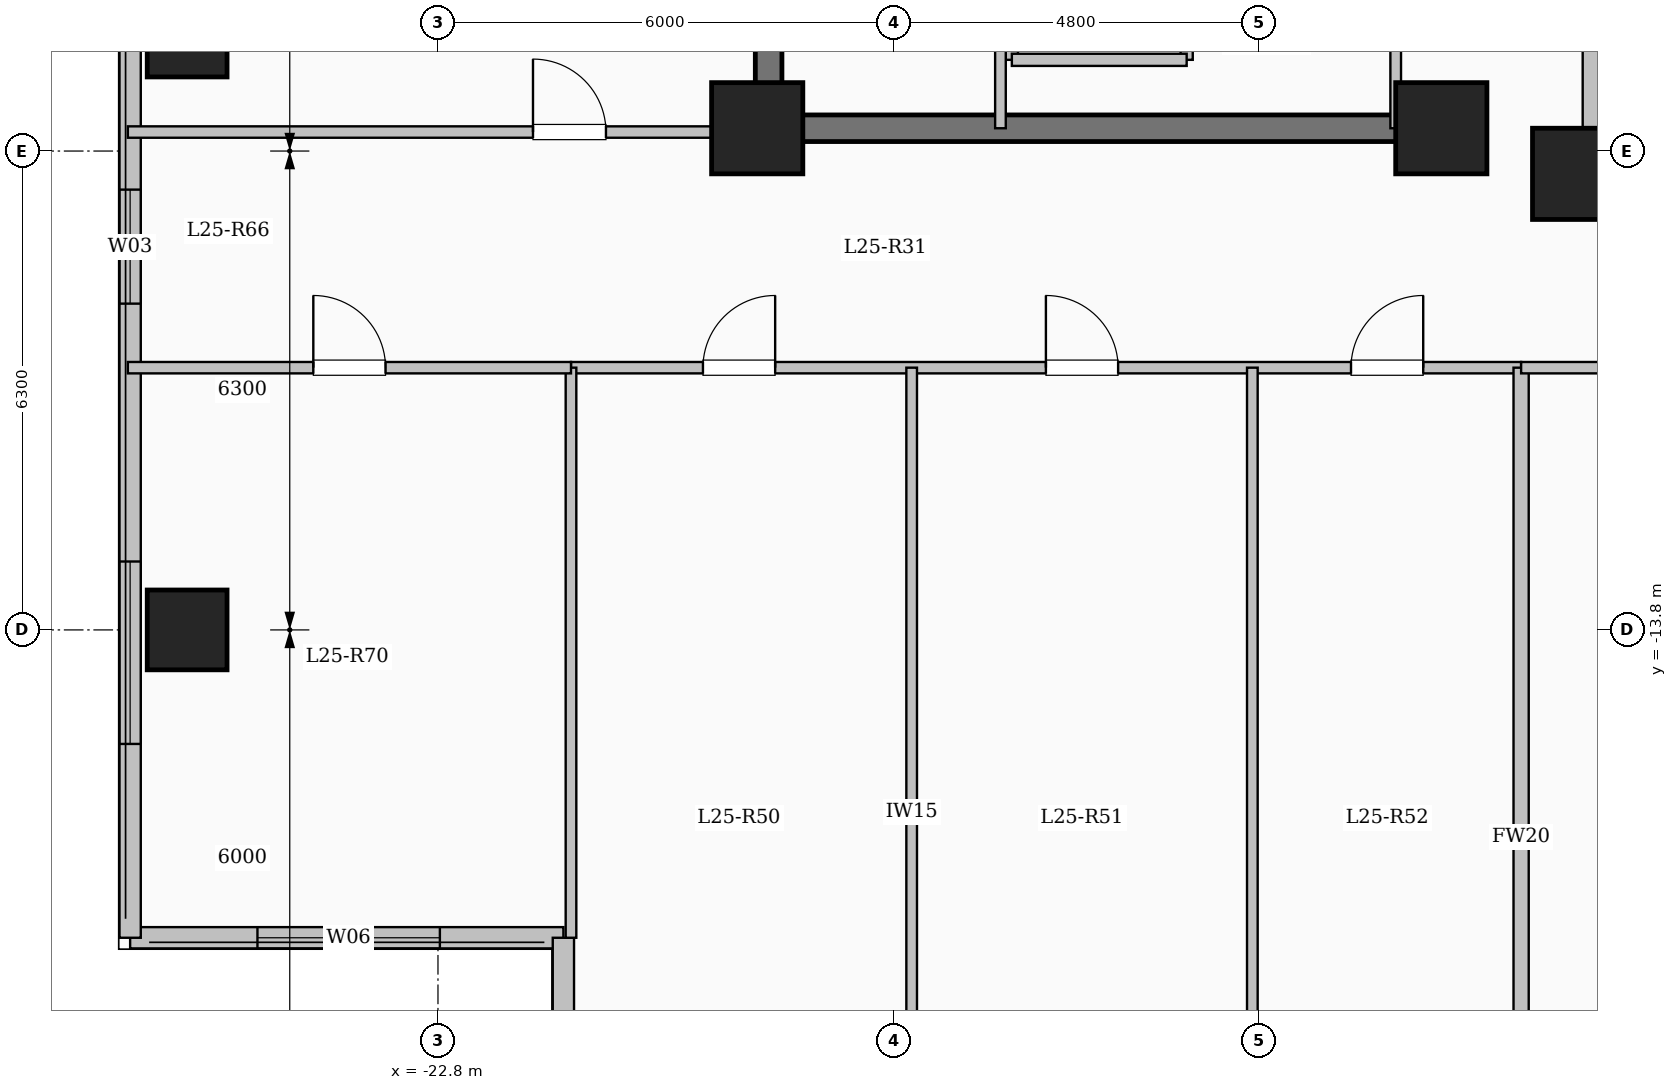
"""IFC4 building model, lengths in metres.
Left out: names, types, materials, properties, quantities, classifications, styles, units other than length and angle.
Written with IfcOpenShell. Run it as: python <this file> out.ifc"""

import sys

from ifc_helpers import new_model, si_unit, direction, frame, frame_2d, origin, origin_2d, place, context, subcontext, project, spatial, rectangle, extrude, element, fill, save


model = new_model("IFC4")
c1 = context("Model", 3, precision=1e-05, world=origin(), true_north=direction((0.0, 1.0)))
c2 = subcontext(c1, "Body", "Model", "MODEL_VIEW")
j1 = project(units=[si_unit("LENGTHUNIT", "METRE"), si_unit("PLANEANGLEUNIT", "RADIAN")], contexts=[c1])
p1 = place(None, origin())
s1 = spatial("IfcSite", under=j1, at=p1, CompositionType="ELEMENT")
p2 = place(p1, origin())
s2 = spatial("IfcBuilding", under=s1, at=p2, CompositionType="ELEMENT")
p3 = place(p2, frame((0.0, 0.0, 95.05)))
s3 = spatial("IfcBuildingStorey", under=s2, at=p3, CompositionType="ELEMENT", Elevation=95.05)
for number, where, z_axis, x_axis in (
    (1, (-7.8, -7.8, 0.0), (0.0, 0.0, 1.0), (1.0, 0.0, 0.0)),
    (2, (-9.6, -7.2, 0.0), (0.0, 0.0, 1.0), (1.0, 0.0, 0.0)),
    (3, (-18.6, -7.2, 0.0), (0.0, 0.0, 1.0), (1.0, 0.0, 0.0)),
):
    element("IfcColumn", number, at=place(p3, frame(where, z_axis=z_axis, x_axis=x_axis)), inside=s3, PredefinedType="COLUMN", context=c2, shape_type="SweptSolid", body=[
        extrude(rectangle(XDim=1.2, YDim=1.2, at=origin_2d()), origin(), (0.0, 0.0, 1.0), 3.35),
    ])
for number, where, z_axis, x_axis in (
    (4, (-26.1, -13.8, 0.0), (0.0, 0.0, 1.0), (1.0, 0.0, 0.0)),
    (5, (-26.1, -6.0, 0.0), (0.0, 0.0, 1.0), (1.0, 0.0, 0.0)),
):
    element("IfcColumn", number, at=place(p3, frame(where, z_axis=z_axis, x_axis=x_axis)), inside=s3, PredefinedType="COLUMN", context=c2, shape_type="SweptSolid", body=[
        extrude(rectangle(XDim=1.05, YDim=1.05, at=origin_2d()), origin(), (0.0, 0.0, 1.0), 3.35),
    ])
p4 = place(p3, frame((-7.62, -7.62, 0.0), z_axis=(0.0, 0.0, 1.0), x_axis=(1.0, 0.0, 0.0)))
e6 = element("IfcWall", 6, at=p4, inside=s3, PredefinedType="SOLIDWALL", context=c2, shape_type="SweptSolid", body=[
    extrude(rectangle(XDim=15.24, YDim=0.24, at=frame_2d((7.62, 0.0))), origin(), (0.0, 0.0, 1.0), 3.1),
])
p5 = place(p4, frame((6.92, 0.0, 0.95)))
e7 = element("IfcOpeningElement", 7, at=p5, cuts=e6, PredefinedType="OPENING", context=c2, shape_type="SweptSolid", body=[
    extrude(rectangle(XDim=1.4, YDim=1.5, at=frame_2d((0.7, 0.75))), frame((0.0, 0.13, 0.0), z_axis=(0.0, -1.0, 0.0), x_axis=(1.0, 0.0, 0.0)), (0.0, 0.0, 1.0), 0.26),
])
p6 = place(p3, frame((-7.62, 7.62, 0.0), z_axis=(0.0, 0.0, 1.0), x_axis=(0.0, -1.0, 0.0)))
e8 = element("IfcWall", 8, at=p6, inside=s3, PredefinedType="SOLIDWALL", context=c2, shape_type="SweptSolid", body=[
    extrude(rectangle(XDim=15.24, YDim=0.24, at=frame_2d((7.62, 0.0))), origin(), (0.0, 0.0, 1.0), 3.1),
])
p7 = place(p6, frame((6.92, 0.0, 0.95)))
e9 = element("IfcOpeningElement", 9, at=p7, cuts=e8, PredefinedType="OPENING", context=c2, shape_type="SweptSolid", body=[
    extrude(rectangle(XDim=1.4, YDim=1.5, at=frame_2d((0.7, 0.75))), frame((0.0, 0.13, 0.0), z_axis=(0.0, -1.0, 0.0), x_axis=(1.0, 0.0, 0.0)), (0.0, 0.0, 1.0), 0.26),
])
p8 = place(p3, frame((-21.15, -17.85, 0.0), z_axis=(0.0, 0.0, 1.0), x_axis=(-1.0, 0.0, 0.0)))
e10 = element("IfcWall", 10, at=p8, inside=s3, PredefinedType="SOLIDWALL", context=c2, shape_type="SweptSolid", body=[
    extrude(rectangle(XDim=5.7, YDim=0.28, at=frame_2d((2.85, 0.0))), origin(), (0.0, 0.0, 1.0), 3.1),
])
p9 = place(p8, frame((1.625, 0.0, 0.9)))
e11 = element("IfcOpeningElement", 11, at=p9, cuts=e10, PredefinedType="OPENING", context=c2, shape_type="SweptSolid", body=[
    extrude(rectangle(XDim=2.4, YDim=1.8, at=frame_2d((1.2, 0.9))), frame((0.0, 0.15, 0.0), z_axis=(0.0, -1.0, 0.0), x_axis=(1.0, 0.0, 0.0)), (0.0, 0.0, 1.0), 0.3),
])
p10 = place(p3, frame((-26.85, -17.85, 0.0), z_axis=(0.0, 0.0, 1.0), x_axis=(0.0, 1.0, 0.0)))
e12 = element("IfcWall", 12, at=p10, inside=s3, PredefinedType="SOLIDWALL", context=c2, shape_type="SweptSolid", body=[
    extrude(rectangle(XDim=35.7, YDim=0.28, at=frame_2d((17.85, 0.0))), origin(), (0.0, 0.0, 1.0), 3.1),
])
p11 = place(p10, frame((2.55, 0.0, 0.9)))
e13 = element("IfcOpeningElement", 13, at=p11, cuts=e12, PredefinedType="OPENING", context=c2, shape_type="SweptSolid", body=[
    extrude(rectangle(XDim=2.4, YDim=1.8, at=frame_2d((1.2, 0.9))), frame((0.0, 0.15, 0.0), z_axis=(0.0, -1.0, 0.0), x_axis=(1.0, 0.0, 0.0)), (0.0, 0.0, 1.0), 0.3),
])
p12 = place(p10, frame((8.343, 0.0, 0.9)))
e14 = element("IfcOpeningElement", 14, at=p12, cuts=e12, PredefinedType="OPENING", context=c2, shape_type="SweptSolid", body=[
    extrude(rectangle(XDim=1.5, YDim=1.65, at=frame_2d((0.75, 0.825))), frame((0.0, 0.15, 0.0), z_axis=(0.0, -1.0, 0.0), x_axis=(1.0, 0.0, 0.0)), (0.0, 0.0, 1.0), 0.3),
])
p13 = place(p10, frame((13.75, 0.0, 0.9)))
e15 = element("IfcOpeningElement", 15, at=p13, cuts=e12, PredefinedType="OPENING", context=c2, shape_type="SweptSolid", body=[
    extrude(rectangle(XDim=2.4, YDim=1.8, at=frame_2d((1.2, 0.9))), frame((0.0, 0.15, 0.0), z_axis=(0.0, -1.0, 0.0), x_axis=(1.0, 0.0, 0.0)), (0.0, 0.0, 1.0), 0.3),
])
p14 = place(p10, frame((20.175, 0.0, 0.9)))
e16 = element("IfcOpeningElement", 16, at=p14, cuts=e12, PredefinedType="OPENING", context=c2, shape_type="SweptSolid", body=[
    extrude(rectangle(XDim=1.8, YDim=1.65, at=frame_2d((0.9, 0.825))), frame((0.0, 0.15, 0.0), z_axis=(0.0, -1.0, 0.0), x_axis=(1.0, 0.0, 0.0)), (0.0, 0.0, 1.0), 0.3),
])
p15 = place(p10, frame((24.725, 0.0, 0.9)))
e17 = element("IfcOpeningElement", 17, at=p15, cuts=e12, PredefinedType="OPENING", context=c2, shape_type="SweptSolid", body=[
    extrude(rectangle(XDim=2.0, YDim=1.7, at=frame_2d((1.0, 0.85))), frame((0.0, 0.15, 0.0), z_axis=(0.0, -1.0, 0.0), x_axis=(1.0, 0.0, 0.0)), (0.0, 0.0, 1.0), 0.3),
])
p16 = place(p10, frame((28.975, 0.0, 0.95)))
e18 = element("IfcOpeningElement", 18, at=p16, cuts=e12, PredefinedType="OPENING", context=c2, shape_type="SweptSolid", body=[
    extrude(rectangle(XDim=1.0, YDim=1.5, at=frame_2d((0.5, 0.75))), frame((0.0, 0.15, 0.0), z_axis=(0.0, -1.0, 0.0), x_axis=(1.0, 0.0, 0.0)), (0.0, 0.0, 1.0), 0.3),
])
p17 = place(p10, frame((32.025, 0.0, 0.9)))
e19 = element("IfcOpeningElement", 19, at=p17, cuts=e12, PredefinedType="OPENING", context=c2, shape_type="SweptSolid", body=[
    extrude(rectangle(XDim=2.0, YDim=1.7, at=frame_2d((1.0, 0.85))), frame((0.0, 0.15, 0.0), z_axis=(0.0, -1.0, 0.0), x_axis=(1.0, 0.0, 0.0)), (0.0, 0.0, 1.0), 0.3),
])
p18 = place(p3, frame((-21.15, -22.05, 0.0), z_axis=(0.0, 0.0, 1.0), x_axis=(0.0, 1.0, 0.0)))
e20 = element("IfcWall", 20, at=p18, inside=s3, PredefinedType="SOLIDWALL", context=c2, shape_type="SweptSolid", body=[
    extrude(rectangle(XDim=4.2, YDim=0.28, at=frame_2d((2.1, 0.0))), origin(), (0.0, 0.0, 1.0), 3.1),
])
p19 = place(p18, frame((1.118, 0.0, 0.9)))
e21 = element("IfcOpeningElement", 21, at=p19, cuts=e20, PredefinedType="OPENING", context=c2, shape_type="SweptSolid", body=[
    extrude(rectangle(XDim=2.0, YDim=1.7, at=frame_2d((1.0, 0.85))), frame((0.0, 0.15, 0.0), z_axis=(0.0, -1.0, 0.0), x_axis=(1.0, 0.0, 0.0)), (0.0, 0.0, 1.0), 0.3),
])
for number, where, z_axis, x_axis in (
    (22, (-15.25, -6.3, 0.0), (0.0, 0.0, 1.0), (0.0, 1.0, 0.0)),
    (23, (-12.95, -6.3, 0.0), (0.0, 0.0, 1.0), (0.0, 1.0, 0.0)),
):
    element("IfcWall", number, at=place(p3, frame(where, z_axis=z_axis, x_axis=x_axis)), inside=s3, PredefinedType="SOLIDWALL", context=c2, shape_type="SweptSolid", body=[
        extrude(rectangle(XDim=2.6, YDim=0.16, at=frame_2d((1.3, 0.0))), origin(), (0.0, 0.0, 1.0), 3.1),
    ])
p20 = place(p3, frame((-15.25, -6.3, 0.0), z_axis=(0.0, 0.0, 1.0), x_axis=(1.0, 0.0, 0.0)))
e24 = element("IfcWall", 24, at=p20, inside=s3, PredefinedType="SOLIDWALL", context=c2, shape_type="SweptSolid", body=[
    extrude(rectangle(XDim=2.3, YDim=0.16, at=frame_2d((1.15, 0.0))), origin(), (0.0, 0.0, 1.0), 3.1),
])
p21 = place(p3, frame((-18.45, -7.375, 0.0), z_axis=(0.0, 0.0, 1.0), x_axis=(0.0, 1.0, 0.0)))
e25 = element("IfcWall", 25, at=p21, inside=s3, PredefinedType="SHEAR", context=c2, shape_type="SweptSolid", body=[
    extrude(rectangle(XDim=14.05, YDim=0.35, at=frame_2d((7.025, 0.0))), origin(), (0.0, 0.0, 1.0), 3.35),
])
p22 = place(p3, frame((-18.625, -7.2, 0.0), z_axis=(0.0, 0.0, 1.0), x_axis=(1.0, 0.0, 0.0)))
e26 = element("IfcWall", 26, at=p22, inside=s3, PredefinedType="SHEAR", context=c2, shape_type="SweptSolid", body=[
    extrude(rectangle(XDim=8.55, YDim=0.35, at=frame_2d((4.275, 0.0))), origin(), (0.0, 0.0, 1.0), 3.35),
])
p23 = place(p3, frame((-15.4, -7.2, 0.0), z_axis=(0.0, 0.0, 1.0), x_axis=(0.0, 1.0, 0.0)))
e27 = element("IfcWall", 27, at=p23, inside=s3, PredefinedType="PARTITIONING", context=c2, shape_type="SweptSolid", body=[
    extrude(rectangle(XDim=10.45, YDim=0.14, at=frame_2d((5.225, 0.0))), origin(), (0.0, 0.0, 1.0), 3.1),
])
p24 = place(p23, frame((9.25, 0.0, 0.0)))
e28 = element("IfcOpeningElement", 28, at=p24, cuts=e27, PredefinedType="OPENING", context=c2, shape_type="SweptSolid", body=[
    extrude(rectangle(XDim=0.9, YDim=2.08, at=frame_2d((0.45, 1.04))), frame((0.0, 0.08, 0.0), z_axis=(0.0, -1.0, 0.0), x_axis=(1.0, 0.0, 0.0)), (0.0, 0.0, 1.0), 0.16),
])
p25 = place(p3, frame((-10.2, -7.2, 0.0), z_axis=(0.0, 0.0, 1.0), x_axis=(0.0, 1.0, 0.0)))
e29 = element("IfcWall", 29, at=p25, inside=s3, PredefinedType="PARTITIONING", context=c2, shape_type="SweptSolid", body=[
    extrude(rectangle(XDim=9.12, YDim=0.14, at=frame_2d((4.56, 0.0))), origin(), (0.0, 0.0, 1.0), 3.1),
])
p26 = place(p25, frame((1.9, 0.0, 0.0)))
e30 = element("IfcOpeningElement", 30, at=p26, cuts=e29, PredefinedType="OPENING", context=c2, shape_type="SweptSolid", body=[
    extrude(rectangle(XDim=0.95, YDim=2.12, at=frame_2d((0.475, 1.06))), frame((0.0, 0.08, 0.0), z_axis=(0.0, -1.0, 0.0), x_axis=(1.0, 0.0, 0.0)), (0.0, 0.0, 1.0), 0.16),
])
p27 = place(p25, frame((5.0, 0.0, 0.0)))
e31 = element("IfcOpeningElement", 31, at=p27, cuts=e29, PredefinedType="OPENING", context=c2, shape_type="SweptSolid", body=[
    extrude(rectangle(XDim=0.95, YDim=2.12, at=frame_2d((0.475, 1.06))), frame((0.0, 0.08, 0.0), z_axis=(0.0, -1.0, 0.0), x_axis=(1.0, 0.0, 0.0)), (0.0, 0.0, 1.0), 0.16),
])
p28 = place(p3, frame((-21.05, -10.35, 0.0), z_axis=(0.0, 0.0, 1.0), x_axis=(1.0, 0.0, 0.0)))
e32 = element("IfcWall", 32, at=p28, inside=s3, PredefinedType="PARTITIONING", context=c2, shape_type="SweptSolid", body=[
    extrude(rectangle(XDim=12.5, YDim=0.15, at=frame_2d((6.25, 0.0))), origin(), (0.0, 0.0, 1.0), 3.1),
])
p29 = place(p28, frame((1.736, 0.0, 0.0)))
e33 = element("IfcOpeningElement", 33, at=p29, cuts=e32, PredefinedType="OPENING", context=c2, shape_type="SweptSolid", body=[
    extrude(rectangle(XDim=0.95, YDim=2.15, at=frame_2d((0.475, 1.075))), frame((0.0, 0.085, 0.0), z_axis=(0.0, -1.0, 0.0), x_axis=(1.0, 0.0, 0.0)), (0.0, 0.0, 1.0), 0.17),
])
p30 = place(p28, frame((6.248, 0.0, 0.0)))
e34 = element("IfcOpeningElement", 34, at=p30, cuts=e32, PredefinedType="OPENING", context=c2, shape_type="SweptSolid", body=[
    extrude(rectangle(XDim=0.95, YDim=2.15, at=frame_2d((0.475, 1.075))), frame((0.0, 0.085, 0.0), z_axis=(0.0, -1.0, 0.0), x_axis=(1.0, 0.0, 0.0)), (0.0, 0.0, 1.0), 0.17),
])
p31 = place(p28, frame((10.262, 0.0, 0.0)))
e35 = element("IfcOpeningElement", 35, at=p31, cuts=e32, PredefinedType="OPENING", context=c2, shape_type="SweptSolid", body=[
    extrude(rectangle(XDim=0.95, YDim=2.15, at=frame_2d((0.475, 1.075))), frame((0.0, 0.085, 0.0), z_axis=(0.0, -1.0, 0.0), x_axis=(1.0, 0.0, 0.0)), (0.0, 0.0, 1.0), 0.17),
])
for number, where, z_axis, x_axis in (
    (36, (-16.568, -22.05, 0.0), (0.0, 0.0, 1.0), (0.0, 1.0, 0.0)),
    (37, (-12.086, -22.05, 0.0), (0.0, 0.0, 1.0), (0.0, 1.0, 0.0)),
):
    element("IfcWall", number, at=place(p3, frame(where, z_axis=z_axis, x_axis=x_axis)), inside=s3, PredefinedType="PARTITIONING", context=c2, shape_type="SweptSolid", body=[
        extrude(rectangle(XDim=11.7, YDim=0.14, at=frame_2d((5.85, 0.0))), origin(), (0.0, 0.0, 1.0), 3.1),
    ])
p32 = place(p3, frame((-8.55, -22.704, 0.0), z_axis=(0.0, 0.0, 1.0), x_axis=(0.0, 1.0, 0.0)))
e38 = element("IfcWall", 38, at=p32, inside=s3, PredefinedType="SOLIDWALL", context=c2, shape_type="SweptSolid", body=[
    extrude(rectangle(XDim=12.354, YDim=0.2, at=frame_2d((6.177, 0.0))), origin(), (0.0, 0.0, 1.0), 3.1),
])
p33 = place(p3, frame((-8.55, -10.35, 0.0), z_axis=(0.0, 0.0, 1.0), x_axis=(1.0, 0.0, 0.0)))
e39 = element("IfcWall", 39, at=p33, inside=s3, PredefinedType="PARTITIONING", context=c2, shape_type="SweptSolid", body=[
    extrude(rectangle(XDim=17.1, YDim=0.15, at=frame_2d((8.55, 0.0))), origin(), (0.0, 0.0, 1.0), 3.1),
])
p34 = place(p33, frame((1.6, 0.0, 0.0)))
e40 = element("IfcOpeningElement", 40, at=p34, cuts=e39, PredefinedType="OPENING", context=c2, shape_type="SweptSolid", body=[
    extrude(rectangle(XDim=0.96, YDim=2.15, at=frame_2d((0.48, 1.075))), frame((0.0, 0.085, 0.0), z_axis=(0.0, -1.0, 0.0), x_axis=(1.0, 0.0, 0.0)), (0.0, 0.0, 1.0), 0.17),
])
p35 = place(p3, frame((-26.88, -7.25, 0.0), z_axis=(0.0, 0.0, 1.0), x_axis=(1.0, 0.0, 0.0)))
e41 = element("IfcWall", 41, at=p35, inside=s3, PredefinedType="PARTITIONING", context=c2, shape_type="SweptSolid", body=[
    extrude(rectangle(XDim=8.43, YDim=0.15, at=frame_2d((4.215, 0.0))), origin(), (0.0, 0.0, 1.0), 3.1),
])
p36 = place(p35, frame((5.33, 0.0, 0.0)))
e42 = element("IfcOpeningElement", 42, at=p36, cuts=e41, PredefinedType="OPENING", context=c2, shape_type="SweptSolid", body=[
    extrude(rectangle(XDim=0.96, YDim=2.15, at=frame_2d((0.48, 1.075))), frame((0.0, 0.085, 0.0), z_axis=(0.0, -1.0, 0.0), x_axis=(1.0, 0.0, 0.0)), (0.0, 0.0, 1.0), 0.17),
])
p37 = place(p3, frame((-21.05, -17.85, 0.0), z_axis=(0.0, 0.0, 1.0), x_axis=(0.0, 1.0, 0.0)))
e43 = element("IfcWall", 43, at=p37, inside=s3, PredefinedType="PARTITIONING", context=c2, shape_type="SweptSolid", body=[
    extrude(rectangle(XDim=7.5, YDim=0.14, at=frame_2d((3.75, 0.0))), origin(), (0.0, 0.0, 1.0), 3.1),
])
p38 = place(p3, frame((-26.88, -10.35, 0.0), z_axis=(0.0, 0.0, 1.0), x_axis=(1.0, 0.0, 0.0)))
e44 = element("IfcWall", 44, at=p38, inside=s3, PredefinedType="PARTITIONING", context=c2, shape_type="SweptSolid", body=[
    extrude(rectangle(XDim=5.83, YDim=0.15, at=frame_2d((2.915, 0.0))), origin(), (0.0, 0.0, 1.0), 3.1),
])
p39 = place(p38, frame((2.44, 0.0, 0.0)))
e45 = element("IfcOpeningElement", 45, at=p39, cuts=e44, PredefinedType="OPENING", context=c2, shape_type="SweptSolid", body=[
    extrude(rectangle(XDim=0.95, YDim=2.15, at=frame_2d((0.475, 1.075))), frame((0.0, 0.085, 0.0), z_axis=(0.0, -1.0, 0.0), x_axis=(1.0, 0.0, 0.0)), (0.0, 0.0, 1.0), 0.17),
])
p40 = place(p9, origin())
e46 = element("IfcWindow", 46, at=p40, inside=s3, PartitioningType="SINGLE_PANEL", PredefinedType="WINDOW", context=c2, shape_type="SweptSolid", body=[
    extrude(rectangle(XDim=2.4, YDim=1.8, at=frame_2d((1.2, 0.9))), frame((0.0, 0.03, 0.0), z_axis=(0.0, -1.0, 0.0), x_axis=(1.0, 0.0, 0.0)), (0.0, 0.0, 1.0), 0.06),
])
fill(e11, e46)
p41 = place(p11, origin())
e47 = element("IfcWindow", 47, at=p41, inside=s3, PartitioningType="SINGLE_PANEL", PredefinedType="WINDOW", context=c2, shape_type="SweptSolid", body=[
    extrude(rectangle(XDim=2.4, YDim=1.8, at=frame_2d((1.2, 0.9))), frame((0.0, 0.03, 0.0), z_axis=(0.0, -1.0, 0.0), x_axis=(1.0, 0.0, 0.0)), (0.0, 0.0, 1.0), 0.06),
])
fill(e13, e47)
p42 = place(p12, origin())
e48 = element("IfcWindow", 48, at=p42, inside=s3, PartitioningType="SINGLE_PANEL", PredefinedType="WINDOW", context=c2, shape_type="SweptSolid", body=[
    extrude(rectangle(XDim=1.5, YDim=1.65, at=frame_2d((0.75, 0.825))), frame((0.0, 0.03, 0.0), z_axis=(0.0, -1.0, 0.0), x_axis=(1.0, 0.0, 0.0)), (0.0, 0.0, 1.0), 0.06),
])
fill(e14, e48)
p43 = place(p29, origin())
e49 = element("IfcDoor", 49, at=p43, inside=s3, OperationType="SINGLE_SWING_RIGHT", PredefinedType="DOOR", context=c2, shape_type="SweptSolid", body=[
    extrude(rectangle(XDim=0.95, YDim=2.15, at=frame_2d((0.475, 1.075))), frame((0.0, 0.025, 0.0), z_axis=(0.0, -1.0, 0.0), x_axis=(1.0, 0.0, 0.0)), (0.0, 0.0, 1.0), 0.05),
])
fill(e33, e49)
p44 = place(p30, origin())
e50 = element("IfcDoor", 50, at=p44, inside=s3, OperationType="SINGLE_SWING_LEFT", PredefinedType="DOOR", context=c2, shape_type="SweptSolid", body=[
    extrude(rectangle(XDim=0.95, YDim=2.15, at=frame_2d((0.475, 1.075))), frame((0.0, 0.025, 0.0), z_axis=(0.0, -1.0, 0.0), x_axis=(1.0, 0.0, 0.0)), (0.0, 0.0, 1.0), 0.05),
])
fill(e34, e50)
p45 = place(p31, origin())
e51 = element("IfcDoor", 51, at=p45, inside=s3, OperationType="SINGLE_SWING_RIGHT", PredefinedType="DOOR", context=c2, shape_type="SweptSolid", body=[
    extrude(rectangle(XDim=0.95, YDim=2.15, at=frame_2d((0.475, 1.075))), frame((0.0, 0.025, 0.0), z_axis=(0.0, -1.0, 0.0), x_axis=(1.0, 0.0, 0.0)), (0.0, 0.0, 1.0), 0.05),
])
fill(e35, e51)
p46 = place(p39, origin())
e52 = element("IfcDoor", 52, at=p46, inside=s3, OperationType="SINGLE_SWING_LEFT", PredefinedType="DOOR", context=c2, shape_type="SweptSolid", body=[
    extrude(rectangle(XDim=0.95, YDim=2.15, at=frame_2d((0.475, 1.075))), frame((0.0, 0.025, 0.0), z_axis=(0.0, -1.0, 0.0), x_axis=(1.0, 0.0, 0.0)), (0.0, 0.0, 1.0), 0.05),
])
fill(e45, e52)
p47 = place(p36, origin())
e53 = element("IfcDoor", 53, at=p47, inside=s3, OperationType="SINGLE_SWING_LEFT", PredefinedType="DOOR", context=c2, shape_type="SweptSolid", body=[
    extrude(rectangle(XDim=0.96, YDim=2.15, at=frame_2d((0.48, 1.075))), frame((0.0, 0.025, 0.0), z_axis=(0.0, -1.0, 0.0), x_axis=(1.0, 0.0, 0.0)), (0.0, 0.0, 1.0), 0.05),
])
fill(e42, e53)
save(model, sys.argv[1])
